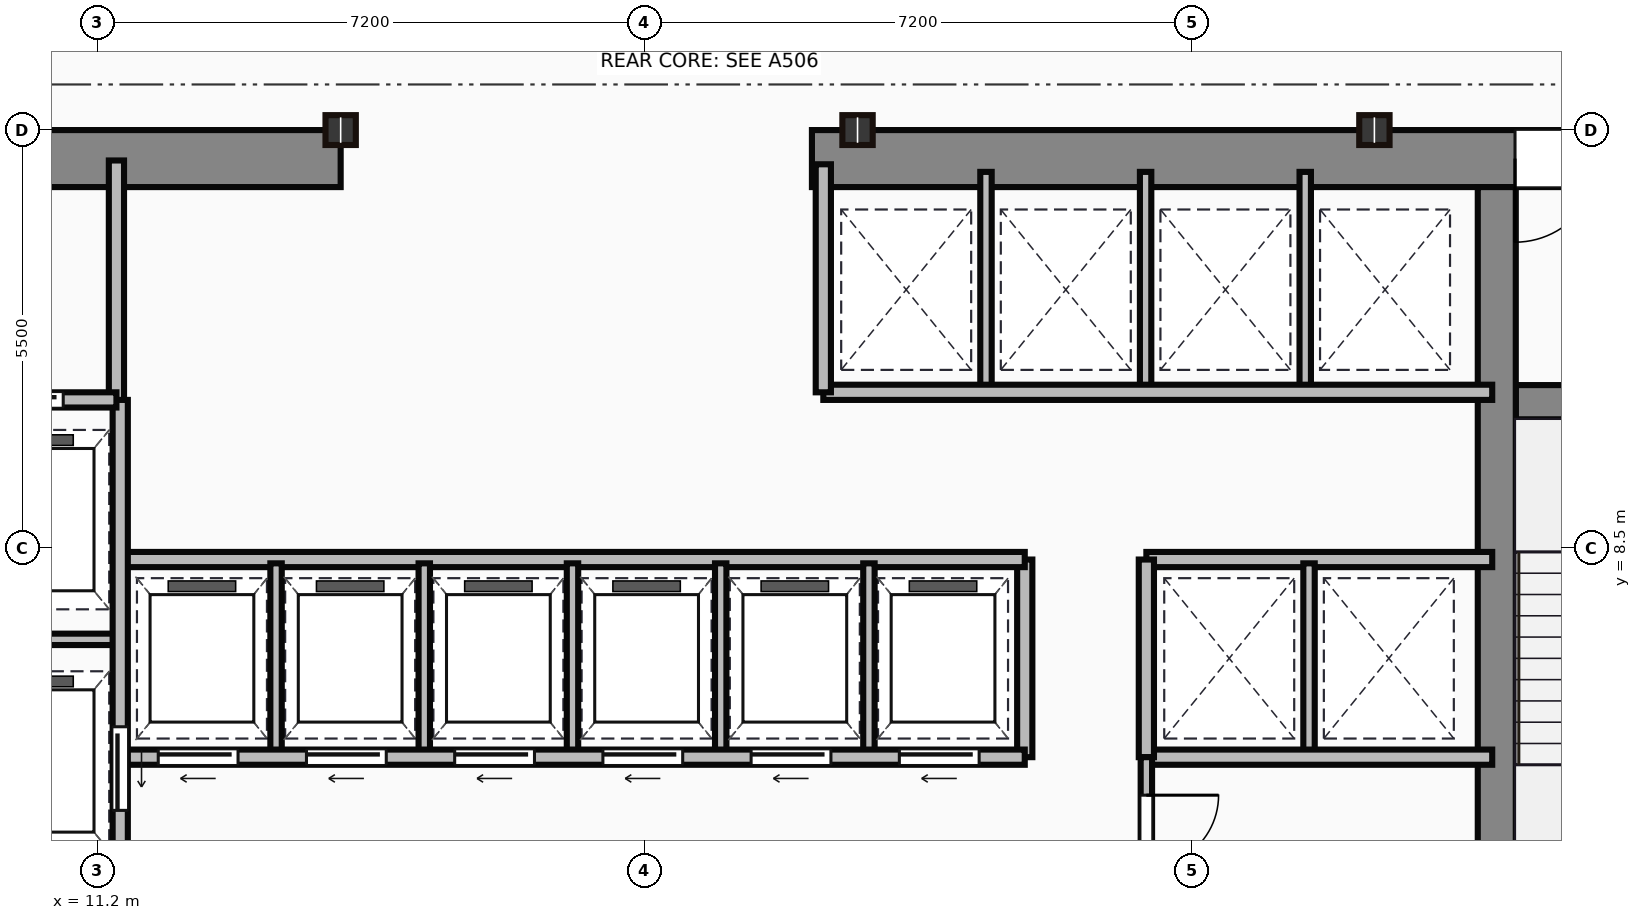
"""IFC4 building model, lengths in metres.
Left out: names, types, materials, properties, quantities, classifications, styles, units other than length and angle.
Written with IfcOpenShell. Run it as: python <this file> out.ifc"""

import sys

from ifc_helpers import new_model, si_unit, direction, frame, frame_2d, origin, origin_2d, place, context, subcontext, project, spatial, rectangle, i_section, extrude, source, transform, mapped, element, fill, save


model = new_model("IFC4")
c1 = context("Model", 3, precision=1e-05, world=origin(), true_north=direction((0.0, 1.0)))
c2 = subcontext(c1, "Body", "Model", "MODEL_VIEW")
j1 = project(units=[si_unit("LENGTHUNIT", "METRE"), si_unit("PLANEANGLEUNIT", "RADIAN")], contexts=[c1])
p1 = place(None, origin())
s1 = spatial("IfcSite", under=j1, at=p1, CompositionType="ELEMENT")
p2 = place(p1, origin())
s2 = spatial("IfcBuilding", under=s1, at=p2, CompositionType="ELEMENT")
p3 = place(p2, frame((0.0, 0.0, 125.15)))
s3 = spatial("IfcBuildingStorey", under=s2, at=p3, CompositionType="ELEMENT", Elevation=125.15)
m1 = source(origin(), c2, "Body", "SweptSolid", [
    extrude(rectangle(XDim=9.1, YDim=0.75, at=frame_2d((4.55, 0.0))), origin(), (0.0, 0.0, 1.0), 3.65),
])
p4 = place(p3, frame((5.3, 13.625, 0.0), z_axis=(0.0, 0.0, 1.0), x_axis=(1.0, 0.0, 0.0)))
e1 = element("IfcWall", 1, at=p4, inside=s3, PredefinedType="SHEAR", context=c2, shape_type="MappedRepresentation", body=[
    mapped(m1, transform((0.0, 0.0, 0.0))),
])
p5 = place(p4, frame((4.1, 0.0, 0.0)))
e2 = element("IfcOpeningElement", 2, at=p5, cuts=e1, PredefinedType="OPENING", context=c2, shape_type="SweptSolid", body=[
    extrude(rectangle(XDim=1.1, YDim=2.15, at=frame_2d((0.55, 1.075))), frame((0.0, 0.385, 0.0), z_axis=(0.0, -1.0, 0.0), x_axis=(1.0, 0.0, 0.0)), (0.0, 0.0, 1.0), 0.77),
])
m2 = source(origin(), c2, "Body", "SweptSolid", [
    extrude(rectangle(XDim=12.6, YDim=0.75, at=frame_2d((6.3, 0.0))), origin(), (0.0, 0.0, 1.0), 3.65),
])
p6 = place(p3, frame((20.6, 13.625, 0.0), z_axis=(0.0, 0.0, 1.0), x_axis=(1.0, 0.0, 0.0)))
e3 = element("IfcWall", 3, at=p6, inside=s3, PredefinedType="SHEAR", context=c2, shape_type="MappedRepresentation", body=[
    mapped(m2, transform((0.0, 0.0, 0.0))),
])
p7 = place(p6, frame((9.25, 0.0, 0.0)))
e4 = element("IfcOpeningElement", 4, at=p7, cuts=e3, PredefinedType="OPENING", context=c2, shape_type="SweptSolid", body=[
    extrude(rectangle(XDim=1.1, YDim=2.15, at=frame_2d((0.55, 1.075))), frame((0.0, 0.385, 0.0), z_axis=(0.0, -1.0, 0.0), x_axis=(1.0, 0.0, 0.0)), (0.0, 0.0, 1.0), 0.77),
])
m3 = source(origin(), c2, "Body", "SweptSolid", [
    extrude(rectangle(XDim=12.35, YDim=0.5, at=frame_2d((6.175, 0.0))), origin(), (0.0, 0.0, 1.0), 3.65),
])
p8 = place(p3, frame((29.61, 0.9, 0.0), z_axis=(0.0, 0.0, 1.0), x_axis=(0.0, 1.0, 0.0)))
e5 = element("IfcWall", 5, at=p8, inside=s3, PredefinedType="SHEAR", context=c2, shape_type="MappedRepresentation", body=[
    mapped(m3, transform((0.0, 0.0, 0.0))),
])
m4 = source(origin(), c2, "Body", "SweptSolid", [
    extrude(rectangle(XDim=3.39, YDim=0.45, at=frame_2d((1.695, 0.0))), origin(), (0.0, 0.0, 1.0), 3.65),
])
p9 = place(p3, frame((29.86, 10.42, 0.0), z_axis=(0.0, 0.0, 1.0), x_axis=(1.0, 0.0, 0.0)))
e6 = element("IfcWall", 6, at=p9, inside=s3, PredefinedType="SHEAR", context=c2, shape_type="MappedRepresentation", body=[
    mapped(m4, transform((0.0, 0.0, 0.0))),
])
p10 = place(p9, frame((1.1, 0.0, 0.0)))
e7 = element("IfcOpeningElement", 7, at=p10, cuts=e6, PredefinedType="OPENING", context=c2, shape_type="SweptSolid", body=[
    extrude(rectangle(XDim=1.1, YDim=2.15, at=frame_2d((0.55, 1.075))), frame((0.0, 0.235, 0.0), z_axis=(0.0, -1.0, 0.0), x_axis=(1.0, 0.0, 0.0)), (0.0, 0.0, 1.0), 0.47),
])
m5 = source(origin(), c2, "Body", "SweptSolid", [
    extrude(i_section(OverallWidth=0.399, OverallDepth=0.393, WebThickness=0.023, FlangeThickness=0.037, at=origin_2d()), origin(), (0.0, 0.0, 1.0), 3.65),
])
for number, where, z_axis, x_axis in (
    (8, (14.4, 14.0, 0.0), (0.0, 0.0, 1.0), (1.0, 0.0, 0.0)),
    (9, (21.2, 14.0, 0.0), (0.0, 0.0, 1.0), (1.0, 0.0, 0.0)),
    (10, (28.0, 14.0, 0.0), (0.0, 0.0, 1.0), (1.0, 0.0, 0.0)),
):
    element("IfcColumn", number, at=place(p3, frame(where, z_axis=z_axis, x_axis=x_axis)), inside=s3, PredefinedType="COLUMN", context=c2, shape_type="MappedRepresentation", body=[
        mapped(m5, transform((0.0, 0.0, 0.0))),
    ])
m6 = source(origin(), c2, "Body", "SweptSolid", [
    extrude(rectangle(XDim=3.18, YDim=0.2, at=frame_2d((1.59, 0.0))), origin(), (0.0, 0.0, 1.0), 3.4),
])
p11 = place(p3, frame((11.45, 10.42, 0.0), z_axis=(0.0, 0.0, 1.0), x_axis=(0.0, 1.0, 0.0)))
e11 = element("IfcWall", 11, at=p11, inside=s3, PredefinedType="PARTITIONING", context=c2, shape_type="MappedRepresentation", body=[
    mapped(m6, transform((0.0, 0.0, 0.0))),
])
m7 = source(origin(), c2, "Body", "SweptSolid", [
    extrude(rectangle(XDim=2.35, YDim=0.2, at=frame_2d((1.175, 0.0))), origin(), (0.0, 0.0, 1.0), 3.4),
])
p12 = place(p3, frame((9.1, 10.45, 0.0), z_axis=(0.0, 0.0, 1.0), x_axis=(1.0, 0.0, 0.0)))
e12 = element("IfcWall", 12, at=p12, inside=s3, PredefinedType="PARTITIONING", context=c2, shape_type="MappedRepresentation", body=[
    mapped(m7, transform((0.0, 0.0, 0.0))),
])
p13 = place(p12, frame((0.55, 0.0, 0.0)))
e13 = element("IfcOpeningElement", 13, at=p13, cuts=e12, PredefinedType="OPENING", context=c2, shape_type="SweptSolid", body=[
    extrude(rectangle(XDim=1.1, YDim=2.15, at=frame_2d((0.55, 1.075))), frame((0.0, 0.11, 0.0), z_axis=(0.0, -1.0, 0.0), x_axis=(1.0, 0.0, 0.0)), (0.0, 0.0, 1.0), 0.22),
])
m8 = source(origin(), c2, "Body", "SweptSolid", [
    extrude(rectangle(XDim=9.6, YDim=0.2, at=frame_2d((4.8, 0.0))), origin(), (0.0, 0.0, 1.0), 3.4),
])
p14 = place(p3, frame((11.5, 0.85, 0.0), z_axis=(0.0, 0.0, 1.0), x_axis=(0.0, 1.0, 0.0)))
e14 = element("IfcWall", 14, at=p14, inside=s3, PredefinedType="PARTITIONING", context=c2, shape_type="MappedRepresentation", body=[
    mapped(m8, transform((0.0, 0.0, 0.0))),
])
p15 = place(p14, frame((4.2, 0.0, 0.0)))
e15 = element("IfcOpeningElement", 15, at=p15, cuts=e14, PredefinedType="OPENING", context=c2, shape_type="SweptSolid", body=[
    extrude(rectangle(XDim=1.1, YDim=2.15, at=frame_2d((0.55, 1.075))), frame((0.0, 0.11, 0.0), z_axis=(0.0, -1.0, 0.0), x_axis=(1.0, 0.0, 0.0)), (0.0, 0.0, 1.0), 0.22),
])
p16 = place(p14, frame((0.9, 0.0, 0.0)))
e16 = element("IfcOpeningElement", 16, at=p16, cuts=e14, PredefinedType="OPENING", context=c2, shape_type="SweptSolid", body=[
    extrude(rectangle(XDim=1.2, YDim=2.15, at=frame_2d((0.6, 1.075))), frame((0.0, 0.11, 0.0), z_axis=(0.0, -1.0, 0.0), x_axis=(1.0, 0.0, 0.0)), (0.0, 0.0, 1.0), 0.22),
])
m9 = source(origin(), c2, "Body", "SweptSolid", [
    extrude(rectangle(XDim=2.4, YDim=0.15, at=frame_2d((1.2, 0.0))), origin(), (0.0, 0.0, 1.0), 3.4),
])
p17 = place(p3, frame((9.1, 7.3, 0.0), z_axis=(0.0, 0.0, 1.0), x_axis=(1.0, 0.0, 0.0)))
e17 = element("IfcWall", 17, at=p17, inside=s3, PredefinedType="PARTITIONING", context=c2, shape_type="MappedRepresentation", body=[
    mapped(m9, transform((0.0, 0.0, 0.0))),
])
m10 = source(origin(), c2, "Body", "SweptSolid", [
    extrude(rectangle(XDim=11.85, YDim=0.2, at=frame_2d((5.925, 0.0))), origin(), (0.0, 0.0, 1.0), 3.4),
])
p18 = place(p3, frame((11.55, 5.75, 0.0), z_axis=(0.0, 0.0, 1.0), x_axis=(1.0, 0.0, 0.0)))
e18 = element("IfcWall", 18, at=p18, inside=s3, PredefinedType="PARTITIONING", context=c2, shape_type="MappedRepresentation", body=[
    mapped(m10, transform((0.0, 0.0, 0.0))),
])
p19 = place(p18, frame((0.45, 0.0, 0.0)))
e19 = element("IfcOpeningElement", 19, at=p19, cuts=e18, PredefinedType="OPENING", context=c2, shape_type="SweptSolid", body=[
    extrude(rectangle(XDim=1.05, YDim=2.15, at=frame_2d((0.525, 1.075))), frame((0.0, 0.11, 0.0), z_axis=(0.0, -1.0, 0.0), x_axis=(1.0, 0.0, 0.0)), (0.0, 0.0, 1.0), 0.22),
])
p20 = place(p18, frame((2.4, 0.0, 0.0)))
e20 = element("IfcOpeningElement", 20, at=p20, cuts=e18, PredefinedType="OPENING", context=c2, shape_type="SweptSolid", body=[
    extrude(rectangle(XDim=1.05, YDim=2.15, at=frame_2d((0.525, 1.075))), frame((0.0, 0.11, 0.0), z_axis=(0.0, -1.0, 0.0), x_axis=(1.0, 0.0, 0.0)), (0.0, 0.0, 1.0), 0.22),
])
p21 = place(p18, frame((4.35, 0.0, 0.0)))
e21 = element("IfcOpeningElement", 21, at=p21, cuts=e18, PredefinedType="OPENING", context=c2, shape_type="SweptSolid", body=[
    extrude(rectangle(XDim=1.05, YDim=2.15, at=frame_2d((0.525, 1.075))), frame((0.0, 0.11, 0.0), z_axis=(0.0, -1.0, 0.0), x_axis=(1.0, 0.0, 0.0)), (0.0, 0.0, 1.0), 0.22),
])
p22 = place(p18, frame((6.3, 0.0, 0.0)))
e22 = element("IfcOpeningElement", 22, at=p22, cuts=e18, PredefinedType="OPENING", context=c2, shape_type="SweptSolid", body=[
    extrude(rectangle(XDim=1.05, YDim=2.15, at=frame_2d((0.525, 1.075))), frame((0.0, 0.11, 0.0), z_axis=(0.0, -1.0, 0.0), x_axis=(1.0, 0.0, 0.0)), (0.0, 0.0, 1.0), 0.22),
])
p23 = place(p18, frame((8.25, 0.0, 0.0)))
e23 = element("IfcOpeningElement", 23, at=p23, cuts=e18, PredefinedType="OPENING", context=c2, shape_type="SweptSolid", body=[
    extrude(rectangle(XDim=1.05, YDim=2.15, at=frame_2d((0.525, 1.075))), frame((0.0, 0.11, 0.0), z_axis=(0.0, -1.0, 0.0), x_axis=(1.0, 0.0, 0.0)), (0.0, 0.0, 1.0), 0.22),
])
p24 = place(p18, frame((10.2, 0.0, 0.0)))
e24 = element("IfcOpeningElement", 24, at=p24, cuts=e18, PredefinedType="OPENING", context=c2, shape_type="SweptSolid", body=[
    extrude(rectangle(XDim=1.05, YDim=2.15, at=frame_2d((0.525, 1.075))), frame((0.0, 0.11, 0.0), z_axis=(0.0, -1.0, 0.0), x_axis=(1.0, 0.0, 0.0)), (0.0, 0.0, 1.0), 0.22),
])
p25 = place(p3, frame((11.55, 8.35, 0.0), z_axis=(0.0, 0.0, 1.0), x_axis=(1.0, 0.0, 0.0)))
e25 = element("IfcWall", 25, at=p25, inside=s3, PredefinedType="PARTITIONING", context=c2, shape_type="MappedRepresentation", body=[
    mapped(m10, transform((0.0, 0.0, 0.0))),
])
m11 = source(origin(), c2, "Body", "SweptSolid", [
    extrude(rectangle(XDim=2.6, YDim=0.2, at=frame_2d((1.3, 0.0))), origin(), (0.0, 0.0, 1.0), 3.4),
])
p26 = place(p3, frame((23.4, 5.75, 0.0), z_axis=(0.0, 0.0, 1.0), x_axis=(0.0, 1.0, 0.0)))
e26 = element("IfcWall", 26, at=p26, inside=s3, PredefinedType="PARTITIONING", context=c2, shape_type="MappedRepresentation", body=[
    mapped(m11, transform((0.0, 0.0, 0.0))),
])
m12 = source(origin(), c2, "Body", "SweptSolid", [
    extrude(rectangle(XDim=2.5, YDim=0.15, at=frame_2d((1.25, 0.0))), origin(), (0.0, 0.0, 1.0), 3.4),
])
for number, where, z_axis, x_axis in (
    (27, (13.55, 5.8, 0.0), (0.0, 0.0, 1.0), (0.0, 1.0, 0.0)),
    (28, (15.5, 5.8, 0.0), (0.0, 0.0, 1.0), (0.0, 1.0, 0.0)),
    (29, (17.45, 5.8, 0.0), (0.0, 0.0, 1.0), (0.0, 1.0, 0.0)),
    (30, (19.4, 5.8, 0.0), (0.0, 0.0, 1.0), (0.0, 1.0, 0.0)),
    (31, (21.35, 5.8, 0.0), (0.0, 0.0, 1.0), (0.0, 1.0, 0.0)),
):
    element("IfcWall", number, at=place(p3, frame(where, z_axis=z_axis, x_axis=x_axis)), inside=s3, PredefinedType="PARTITIONING", context=c2, shape_type="MappedRepresentation", body=[
        mapped(m12, transform((0.0, 0.0, 0.0))),
    ])
m13 = source(origin(), c2, "Body", "SweptSolid", [
    extrude(rectangle(XDim=8.8, YDim=0.2, at=frame_2d((4.4, 0.0))), origin(), (0.0, 0.0, 1.0), 3.4),
])
p27 = place(p3, frame((20.75, 10.55, 0.0), z_axis=(0.0, 0.0, 1.0), x_axis=(1.0, 0.0, 0.0)))
e32 = element("IfcWall", 32, at=p27, inside=s3, PredefinedType="PARTITIONING", context=c2, shape_type="MappedRepresentation", body=[
    mapped(m13, transform((0.0, 0.0, 0.0))),
])
m14 = source(origin(), c2, "Body", "SweptSolid", [
    extrude(rectangle(XDim=3.0, YDim=0.2, at=frame_2d((1.5, 0.0))), origin(), (0.0, 0.0, 1.0), 3.4),
])
p28 = place(p3, frame((20.75, 10.55, 0.0), z_axis=(0.0, 0.0, 1.0), x_axis=(0.0, 1.0, 0.0)))
e33 = element("IfcWall", 33, at=p28, inside=s3, PredefinedType="PARTITIONING", context=c2, shape_type="MappedRepresentation", body=[
    mapped(m14, transform((0.0, 0.0, 0.0))),
])
m15 = source(origin(), c2, "Body", "SweptSolid", [
    extrude(rectangle(XDim=2.85, YDim=0.15, at=frame_2d((1.425, 0.0))), origin(), (0.0, 0.0, 1.0), 3.4),
])
for number, where, z_axis, x_axis in (
    (34, (22.89, 10.6, 0.0), (0.0, 0.0, 1.0), (0.0, 1.0, 0.0)),
    (35, (24.99, 10.6, 0.0), (0.0, 0.0, 1.0), (0.0, 1.0, 0.0)),
    (36, (27.09, 10.6, 0.0), (0.0, 0.0, 1.0), (0.0, 1.0, 0.0)),
):
    element("IfcWall", number, at=place(p3, frame(where, z_axis=z_axis, x_axis=x_axis)), inside=s3, PredefinedType="PARTITIONING", context=c2, shape_type="MappedRepresentation", body=[
        mapped(m15, transform((0.0, 0.0, 0.0))),
    ])
m16 = source(origin(), c2, "Body", "SweptSolid", [
    extrude(rectangle(XDim=4.55, YDim=0.2, at=frame_2d((2.275, 0.0))), origin(), (0.0, 0.0, 1.0), 3.4),
])
for number, where, z_axis, x_axis in (
    (37, (25.0, 8.35, 0.0), (0.0, 0.0, 1.0), (1.0, 0.0, 0.0)),
    (38, (25.0, 5.75, 0.0), (0.0, 0.0, 1.0), (1.0, 0.0, 0.0)),
):
    element("IfcWall", number, at=place(p3, frame(where, z_axis=z_axis, x_axis=x_axis)), inside=s3, PredefinedType="PARTITIONING", context=c2, shape_type="MappedRepresentation", body=[
        mapped(m16, transform((0.0, 0.0, 0.0))),
    ])
p29 = place(p3, frame((25.0, 5.75, 0.0), z_axis=(0.0, 0.0, 1.0), x_axis=(0.0, 1.0, 0.0)))
e39 = element("IfcWall", 39, at=p29, inside=s3, PredefinedType="PARTITIONING", context=c2, shape_type="MappedRepresentation", body=[
    mapped(m11, transform((0.0, 0.0, 0.0))),
])
p30 = place(p3, frame((27.14, 5.8, 0.0), z_axis=(0.0, 0.0, 1.0), x_axis=(0.0, 1.0, 0.0)))
e40 = element("IfcWall", 40, at=p30, inside=s3, PredefinedType="PARTITIONING", context=c2, shape_type="MappedRepresentation", body=[
    mapped(m12, transform((0.0, 0.0, 0.0))),
])
m17 = source(origin(), c2, "Body", "SweptSolid", [
    extrude(rectangle(XDim=4.9, YDim=0.15, at=frame_2d((2.45, 0.0))), origin(), (0.0, 0.0, 1.0), 3.4),
])
p31 = place(p3, frame((25.0, 0.85, 0.0), z_axis=(0.0, 0.0, 1.0), x_axis=(0.0, 1.0, 0.0)))
e41 = element("IfcWall", 41, at=p31, inside=s3, PredefinedType="PARTITIONING", context=c2, shape_type="MappedRepresentation", body=[
    mapped(m17, transform((0.0, 0.0, 0.0))),
])
p32 = place(p31, frame((1.8, 0.0, 0.0)))
e42 = element("IfcOpeningElement", 42, at=p32, cuts=e41, PredefinedType="OPENING", context=c2, shape_type="SweptSolid", body=[
    extrude(rectangle(XDim=0.95, YDim=2.15, at=frame_2d((0.475, 1.075))), frame((0.0, 0.085, 0.0), z_axis=(0.0, -1.0, 0.0), x_axis=(1.0, 0.0, 0.0)), (0.0, 0.0, 1.0), 0.17),
])
p33 = place(p31, frame((3.45, 0.0, 0.0)))
e43 = element("IfcOpeningElement", 43, at=p33, cuts=e41, PredefinedType="OPENING", context=c2, shape_type="SweptSolid", body=[
    extrude(rectangle(XDim=0.95, YDim=2.15, at=frame_2d((0.475, 1.075))), frame((0.0, 0.085, 0.0), z_axis=(0.0, -1.0, 0.0), x_axis=(1.0, 0.0, 0.0)), (0.0, 0.0, 1.0), 0.17),
])
m18 = source(origin(), c2, "Body", "SweptSolid", [
    extrude(rectangle(XDim=1.1, YDim=2.15, at=frame_2d((0.55, 1.075))), frame((0.0, 0.025, 0.0), z_axis=(0.0, -1.0, 0.0), x_axis=(1.0, 0.0, 0.0)), (0.0, 0.0, 1.0), 0.05),
])
p34 = place(p7, origin())
e44 = element("IfcDoor", 44, at=p34, inside=s3, OperationType="SINGLE_SWING_LEFT", PredefinedType="DOOR", context=c2, shape_type="MappedRepresentation", body=[
    mapped(m18, transform((0.0, 0.0, 0.0))),
])
fill(e4, e44)
p35 = place(p13, origin())
e45 = element("IfcDoor", 45, at=p35, inside=s3, OperationType="SLIDING_TO_LEFT", PredefinedType="DOOR", context=c2, shape_type="MappedRepresentation", body=[
    mapped(m18, transform((0.0, 0.0, 0.0))),
])
fill(e13, e45)
p36 = place(p15, frame((1.1, 0.0, 0.0), z_axis=(0.0, 0.0, 1.0), x_axis=(-1.0, 0.0, 0.0)))
e46 = element("IfcDoor", 46, at=p36, inside=s3, OperationType="SLIDING_TO_LEFT", PredefinedType="DOOR", context=c2, shape_type="MappedRepresentation", body=[
    mapped(m18, transform((0.0, 0.0, 0.0))),
])
fill(e15, e46)
m19 = source(origin(), c2, "Body", "SweptSolid", [
    extrude(rectangle(XDim=1.05, YDim=2.15, at=frame_2d((0.525, 1.075))), frame((0.0, 0.025, 0.0), z_axis=(0.0, -1.0, 0.0), x_axis=(1.0, 0.0, 0.0)), (0.0, 0.0, 1.0), 0.05),
])
p37 = place(p19, frame((1.05, 0.0, 0.0), z_axis=(0.0, 0.0, 1.0), x_axis=(-1.0, 0.0, 0.0)))
e47 = element("IfcDoor", 47, at=p37, inside=s3, OperationType="SLIDING_TO_LEFT", PredefinedType="DOOR", context=c2, shape_type="MappedRepresentation", body=[
    mapped(m19, transform((0.0, 0.0, 0.0))),
])
fill(e19, e47)
p38 = place(p20, frame((1.05, 0.0, 0.0), z_axis=(0.0, 0.0, 1.0), x_axis=(-1.0, 0.0, 0.0)))
e48 = element("IfcDoor", 48, at=p38, inside=s3, OperationType="SLIDING_TO_LEFT", PredefinedType="DOOR", context=c2, shape_type="MappedRepresentation", body=[
    mapped(m19, transform((0.0, 0.0, 0.0))),
])
fill(e20, e48)
p39 = place(p21, frame((1.05, 0.0, 0.0), z_axis=(0.0, 0.0, 1.0), x_axis=(-1.0, 0.0, 0.0)))
e49 = element("IfcDoor", 49, at=p39, inside=s3, OperationType="SLIDING_TO_LEFT", PredefinedType="DOOR", context=c2, shape_type="MappedRepresentation", body=[
    mapped(m19, transform((0.0, 0.0, 0.0))),
])
fill(e21, e49)
p40 = place(p22, frame((1.05, 0.0, 0.0), z_axis=(0.0, 0.0, 1.0), x_axis=(-1.0, 0.0, 0.0)))
e50 = element("IfcDoor", 50, at=p40, inside=s3, OperationType="SLIDING_TO_LEFT", PredefinedType="DOOR", context=c2, shape_type="MappedRepresentation", body=[
    mapped(m19, transform((0.0, 0.0, 0.0))),
])
fill(e22, e50)
p41 = place(p23, frame((1.05, 0.0, 0.0), z_axis=(0.0, 0.0, 1.0), x_axis=(-1.0, 0.0, 0.0)))
e51 = element("IfcDoor", 51, at=p41, inside=s3, OperationType="SLIDING_TO_LEFT", PredefinedType="DOOR", context=c2, shape_type="MappedRepresentation", body=[
    mapped(m19, transform((0.0, 0.0, 0.0))),
])
fill(e23, e51)
p42 = place(p24, frame((1.05, 0.0, 0.0), z_axis=(0.0, 0.0, 1.0), x_axis=(-1.0, 0.0, 0.0)))
e52 = element("IfcDoor", 52, at=p42, inside=s3, OperationType="SLIDING_TO_LEFT", PredefinedType="DOOR", context=c2, shape_type="MappedRepresentation", body=[
    mapped(m19, transform((0.0, 0.0, 0.0))),
])
fill(e24, e52)
m20 = source(origin(), c2, "Body", "SweptSolid", [
    extrude(rectangle(XDim=0.95, YDim=2.15, at=frame_2d((0.475, 1.075))), frame((0.0, 0.025, 0.0), z_axis=(0.0, -1.0, 0.0), x_axis=(1.0, 0.0, 0.0)), (0.0, 0.0, 1.0), 0.05),
])
p43 = place(p33, origin())
e53 = element("IfcDoor", 53, at=p43, inside=s3, OperationType="SINGLE_SWING_RIGHT", PredefinedType="DOOR", context=c2, shape_type="MappedRepresentation", body=[
    mapped(m20, transform((0.0, 0.0, 0.0))),
])
fill(e43, e53)
save(model, sys.argv[1])
